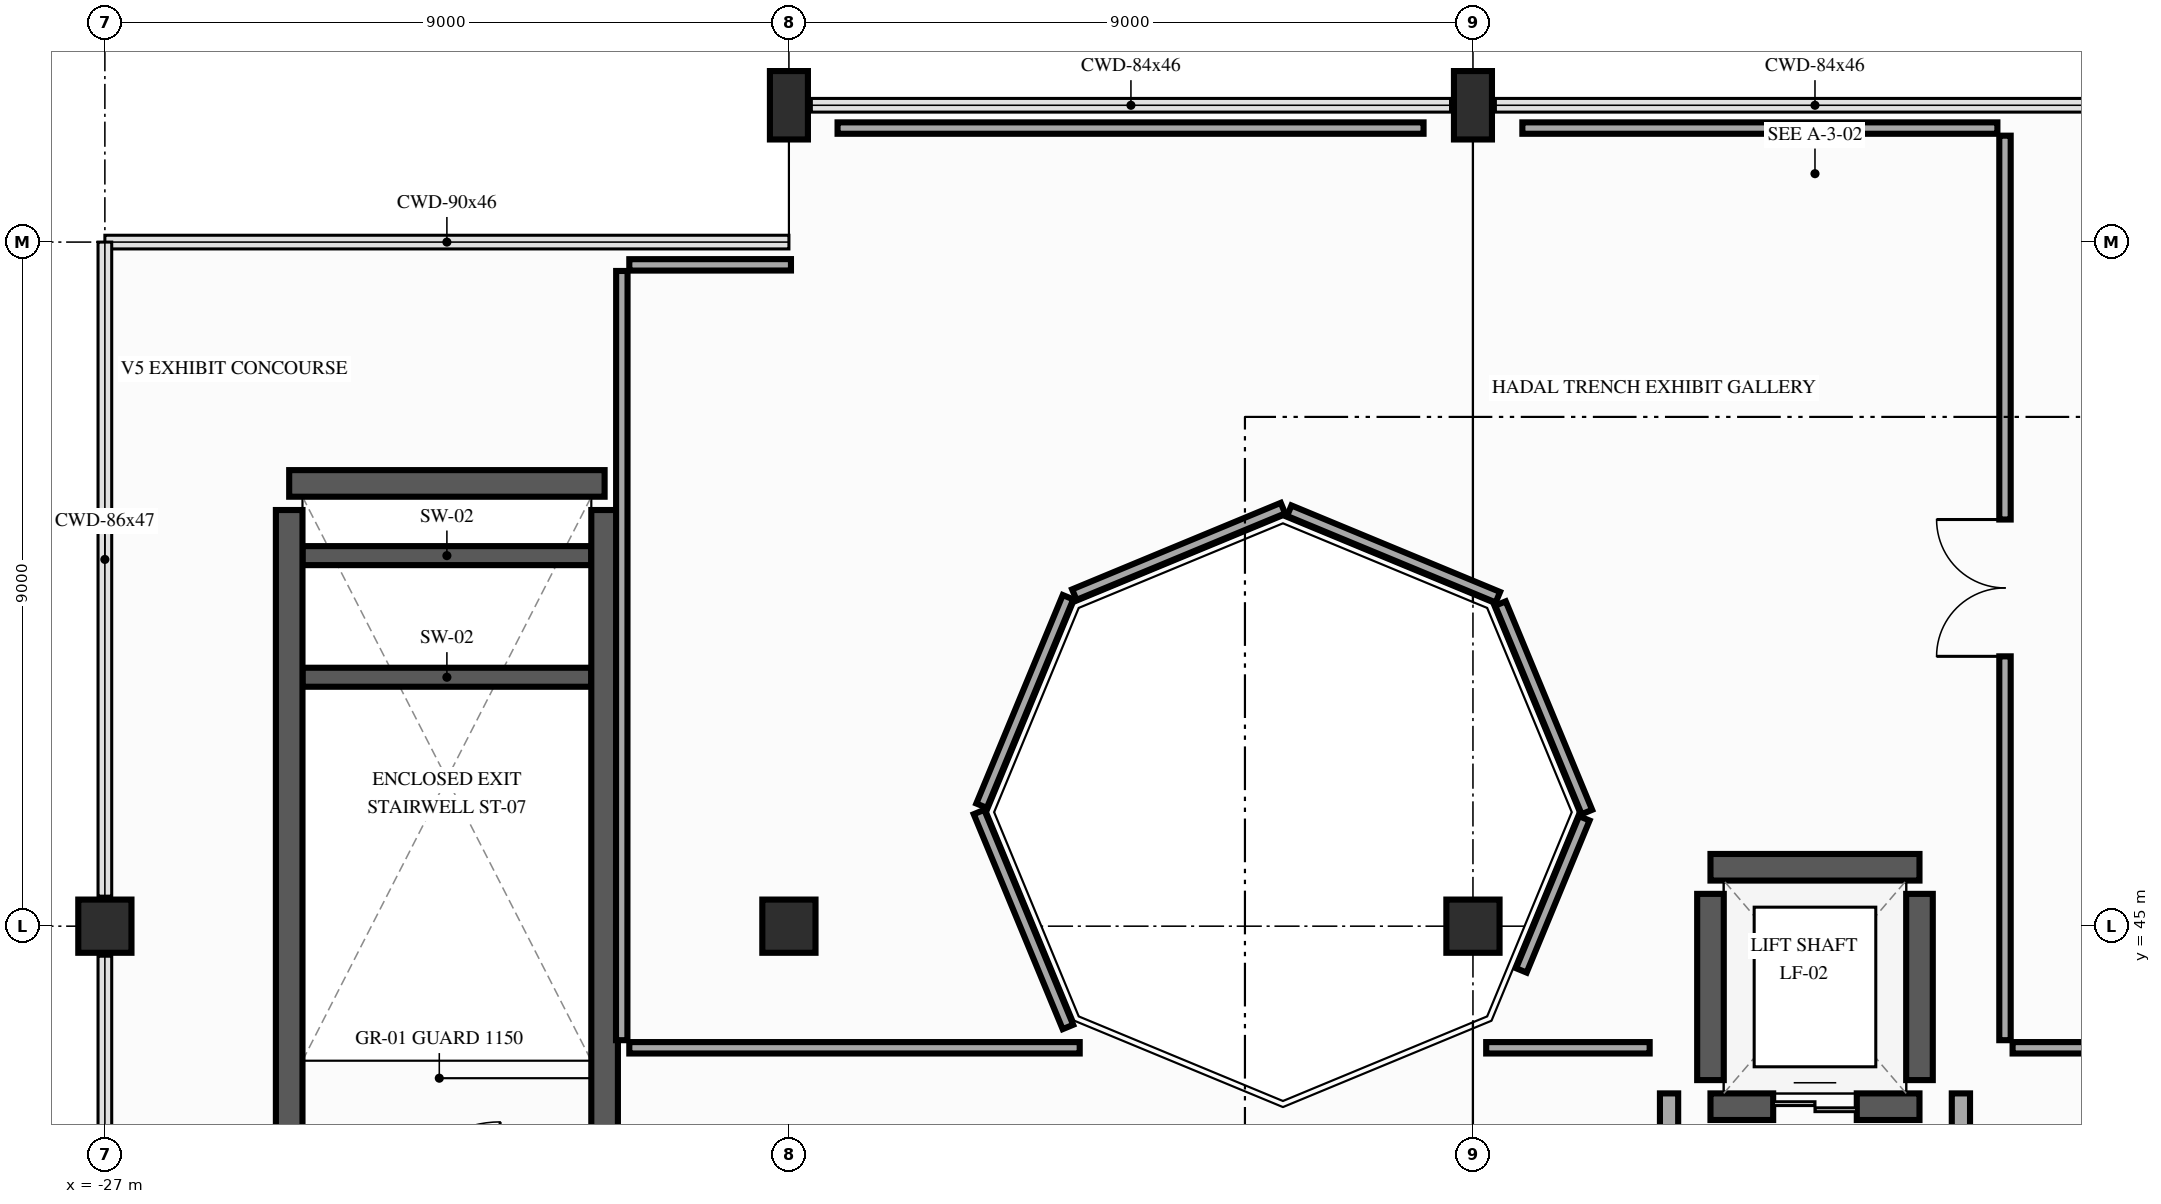
"""IFC4 building model, lengths in metres.
Left out: names, types, materials, properties, quantities, classifications, styles, units other than length and angle.
Written with IfcOpenShell. Run it as: python <this file> out.ifc"""

import sys

from ifc_helpers import new_model, si_unit, direction, frame, frame_2d, origin, origin_2d, place, context, subcontext, project, spatial, rectangle, extrude, element, fill, save


model = new_model("IFC4")
c1 = context("Model", 3, precision=1e-05, world=origin(), true_north=direction((0.0, 1.0)))
c2 = subcontext(c1, "Body", "Model", "MODEL_VIEW")
j1 = project(units=[si_unit("LENGTHUNIT", "METRE"), si_unit("PLANEANGLEUNIT", "RADIAN")], contexts=[c1])
p1 = place(None, origin())
s1 = spatial("IfcSite", under=j1, at=p1, CompositionType="ELEMENT")
p2 = place(p1, origin())
s2 = spatial("IfcBuilding", under=s1, at=p2, CompositionType="ELEMENT")
p3 = place(p2, frame((0.0, 0.0, 21.6)))
s3 = spatial("IfcBuildingStorey", under=s2, at=p3, CompositionType="ELEMENT", Elevation=21.6)
for number, where, z_axis, x_axis in (
    (1, (-27.0, 45.0, 0.0), (0.0, 0.0, 1.0), (1.0, 0.0, 0.0)),
    (2, (-18.0, 45.0, 0.0), (0.0, 0.0, 1.0), (1.0, 0.0, 0.0)),
):
    element("IfcColumn", number, at=place(p3, frame(where, z_axis=z_axis, x_axis=x_axis)), inside=s3, PredefinedType="COLUMN", context=c2, shape_type="SweptSolid", body=[
        extrude(rectangle(XDim=0.7, YDim=0.7, at=origin_2d()), origin(), (0.0, 0.0, 1.0), 5.4),
    ])
p4 = place(p3, frame((-18.0, 55.8, 0.0), z_axis=(0.0, 0.0, 1.0), x_axis=(1.0, 0.0, 0.0)))
e3 = element("IfcColumn", 3, at=p4, inside=s3, PredefinedType="PILASTER", context=c2, shape_type="SweptSolid", body=[
    extrude(rectangle(XDim=0.5, YDim=0.9, at=origin_2d()), origin(), (0.0, 0.0, 1.0), 5.4),
])
p5 = place(p3, frame((-9.0, 45.0, 0.0), z_axis=(0.0, 0.0, 1.0), x_axis=(1.0, 0.0, 0.0)))
e4 = element("IfcColumn", 4, at=p5, inside=s3, PredefinedType="COLUMN", context=c2, shape_type="SweptSolid", body=[
    extrude(rectangle(XDim=0.7, YDim=0.7, at=origin_2d()), origin(), (0.0, 0.0, 1.0), 5.4),
])
p6 = place(p3, frame((-9.0, 55.8, 0.0), z_axis=(0.0, 0.0, 1.0), x_axis=(1.0, 0.0, 0.0)))
e5 = element("IfcColumn", 5, at=p6, inside=s3, PredefinedType="PILASTER", context=c2, shape_type="SweptSolid", body=[
    extrude(rectangle(XDim=0.5, YDim=0.9, at=origin_2d()), origin(), (0.0, 0.0, 1.0), 5.4),
])
for number, where, z_axis, x_axis in (
    (6, (-24.4, 48.275, 0.0), (0.0, 0.0, 1.0), (1.0, 0.0, 0.0)),
    (7, (-24.4, 49.875, 0.0), (0.0, 0.0, 1.0), (1.0, 0.0, 0.0)),
):
    element("IfcWall", number, at=place(p3, frame(where, z_axis=z_axis, x_axis=x_axis)), inside=s3, PredefinedType="SHEAR", context=c2, shape_type="SweptSolid", body=[
        extrude(rectangle(XDim=3.8, YDim=0.25, at=frame_2d((1.9, 0.0))), origin(), (0.0, 0.0, 1.0), 2.5),
    ])
p7 = place(p3, frame((-24.575, 50.825, 0.0), z_axis=(0.0, 0.0, 1.0), x_axis=(1.0, 0.0, 0.0)))
e8 = element("IfcWall", 8, at=p7, inside=s3, PredefinedType="SHEAR", context=c2, shape_type="SweptSolid", body=[
    extrude(rectangle(XDim=4.15, YDim=0.35, at=frame_2d((2.075, 0.0))), origin(), (0.0, 0.0, 1.0), 5.15),
])
for number, where, z_axis, x_axis in (
    (9, (-24.575, 41.375, 0.0), (0.0, 0.0, 1.0), (0.0, 1.0, 0.0)),
    (10, (-20.425, 41.375, 0.0), (0.0, 0.0, 1.0), (0.0, 1.0, 0.0)),
):
    element("IfcWall", number, at=place(p3, frame(where, z_axis=z_axis, x_axis=x_axis)), inside=s3, PredefinedType="SHEAR", context=c2, shape_type="SweptSolid", body=[
        extrude(rectangle(XDim=9.1, YDim=0.35, at=frame_2d((4.55, 0.0))), origin(), (0.0, 0.0, 1.0), 5.15),
    ])
p8 = place(p3, frame((-5.875, 42.625, 0.0), z_axis=(0.0, 0.0, 1.0), x_axis=(1.0, 0.0, 0.0)))
e11 = element("IfcWall", 11, at=p8, inside=s3, PredefinedType="SHEAR", context=c2, shape_type="SweptSolid", body=[
    extrude(rectangle(XDim=2.75, YDim=0.35, at=frame_2d((1.375, 0.0))), origin(), (0.0, 0.0, 1.0), 5.15),
])
p9 = place(p8, frame((0.825, 0.0, 0.0)))
e12 = element("IfcOpeningElement", 12, at=p9, cuts=e11, PredefinedType="OPENING", context=c2, shape_type="SweptSolid", body=[
    extrude(rectangle(XDim=1.1, YDim=2.2, at=frame_2d((0.55, 1.1))), frame((0.0, 0.185, 0.0), z_axis=(0.0, -1.0, 0.0), x_axis=(1.0, 0.0, 0.0)), (0.0, 0.0, 1.0), 0.37),
])
p10 = place(p3, frame((-3.125, 45.775, 0.0), z_axis=(0.0, 0.0, 1.0), x_axis=(-1.0, 0.0, 0.0)))
e13 = element("IfcWall", 13, at=p10, inside=s3, PredefinedType="SHEAR", context=c2, shape_type="SweptSolid", body=[
    extrude(rectangle(XDim=2.75, YDim=0.35, at=frame_2d((1.375, 0.0))), origin(), (0.0, 0.0, 1.0), 5.15),
])
for number, where, z_axis, x_axis in (
    (14, (-5.875, 42.975, 0.0), (0.0, 0.0, 1.0), (0.0, 1.0, 0.0)),
    (15, (-3.125, 42.975, 0.0), (0.0, 0.0, 1.0), (0.0, 1.0, 0.0)),
):
    element("IfcWall", number, at=place(p3, frame(where, z_axis=z_axis, x_axis=x_axis)), inside=s3, PredefinedType="SHEAR", context=c2, shape_type="SweptSolid", body=[
        extrude(rectangle(XDim=2.45, YDim=0.35, at=frame_2d((1.225, 0.0))), origin(), (0.0, 0.0, 1.0), 5.15),
    ])
for number, where, z_axis, x_axis in (
    (16, (-6.42, 39.2, 0.0), (0.0, 0.0, 1.0), (0.0, 1.0, 0.0)),
    (17, (-2.58, 39.2, 0.0), (0.0, 0.0, 1.0), (0.0, 1.0, 0.0)),
):
    element("IfcWall", number, at=place(p3, frame(where, z_axis=z_axis, x_axis=x_axis)), inside=s3, PredefinedType="PARTITIONING", context=c2, shape_type="SweptSolid", body=[
        extrude(rectangle(XDim=3.6, YDim=0.24, at=frame_2d((1.8, 0.0))), origin(), (0.0, 0.0, 1.0), 5.1),
    ])
p11 = place(p3, frame((-20.198, 53.62, 0.0), z_axis=(0.0, 0.0, 1.0), x_axis=(-0.000192994303, -0.999999981377, 0.0)))
e18 = element("IfcWall", 18, at=p11, inside=s3, PredefinedType="PARTITIONING", context=c2, shape_type="SweptSolid", body=[
    extrude(rectangle(XDim=10.12, YDim=0.15, at=frame_2d((5.06, 0.0))), origin(), (0.0, 0.0, 1.0), 5.05),
])
p12 = place(p3, frame((-20.1, 43.4, 0.0), z_axis=(0.0, 0.0, 1.0), x_axis=(1.0, 0.0, 0.0)))
e19 = element("IfcWall", 19, at=p12, inside=s3, PredefinedType="PARTITIONING", context=c2, shape_type="SweptSolid", body=[
    extrude(rectangle(XDim=5.926, YDim=0.15, at=frame_2d((2.963, 0.0))), origin(), (0.0, 0.0, 1.0), 4.685),
])
p13 = place(p3, frame((-14.329, 43.674, 0.0), z_axis=(0.0, 0.0, 1.0), x_axis=(-0.382286027274, 0.924044042971, 0.0)))
e20 = element("IfcWall", 20, at=p13, inside=s3, PredefinedType="PARTITIONING", context=c2, shape_type="SweptSolid", body=[
    extrude(rectangle(XDim=3.06, YDim=0.15, at=frame_2d((1.53, 0.0))), origin(), (0.0, 0.0, 1.0), 4.635),
])
p14 = place(p3, frame((-15.465, 46.585, 0.0), z_axis=(0.0, 0.0, 1.0), x_axis=(0.382985932097, 0.923754174992, 0.0)))
e21 = element("IfcWall", 21, at=p14, inside=s3, PredefinedType="PARTITIONING", context=c2, shape_type="SweptSolid", body=[
    extrude(rectangle(XDim=2.969, YDim=0.15, at=frame_2d((1.485, 0.0))), origin(), (0.0, 0.0, 1.0), 5.05),
])
p15 = place(p3, frame((-14.245, 49.362, 0.0), z_axis=(0.0, 0.0, 1.0), x_axis=(0.923775431697, 0.382934657341, 0.0)))
e22 = element("IfcWall", 22, at=p15, inside=s3, PredefinedType="PARTITIONING", context=c2, shape_type="SweptSolid", body=[
    extrude(rectangle(XDim=2.972, YDim=0.15, at=frame_2d((1.486, 0.0))), origin(), (0.0, 0.0, 1.0), 5.05),
])
p16 = place(p3, frame((-11.417, 50.466, 0.0), z_axis=(0.0, 0.0, 1.0), x_axis=(0.923734314356, -0.383033832031, 0.0)))
e23 = element("IfcWall", 23, at=p16, inside=s3, PredefinedType="PARTITIONING", context=c2, shape_type="SweptSolid", body=[
    extrude(rectangle(XDim=2.971, YDim=0.15, at=frame_2d((1.486, 0.0))), origin(), (0.0, 0.0, 1.0), 4.685),
])
p17 = place(p3, frame((-8.638, 49.245, 0.0), z_axis=(0.0, 0.0, 1.0), x_axis=(0.382886684653, -0.923795316461, 0.0)))
e24 = element("IfcWall", 24, at=p17, inside=s3, PredefinedType="PARTITIONING", context=c2, shape_type="SweptSolid", body=[
    extrude(rectangle(XDim=2.969, YDim=0.15, at=frame_2d((1.485, 0.0))), origin(), (0.0, 0.0, 1.0), 4.685),
])
p18 = place(p3, frame((-7.535, 46.419, 0.0), z_axis=(0.0, 0.0, 1.0), x_axis=(-0.382404898799, -0.923994855708, 0.0)))
e25 = element("IfcWall", 25, at=p18, inside=s3, PredefinedType="PARTITIONING", context=c2, shape_type="SweptSolid", body=[
    extrude(rectangle(XDim=2.166, YDim=0.15, at=frame_2d((1.083, 0.0))), origin(), (0.0, 0.0, 1.0), 5.05),
])
p19 = place(p3, frame((-8.826, 43.4, 0.0), z_axis=(0.0, 0.0, 1.0), x_axis=(1.0, 0.0, 0.0)))
e26 = element("IfcWall", 26, at=p19, inside=s3, PredefinedType="PARTITIONING", context=c2, shape_type="SweptSolid", body=[
    extrude(rectangle(XDim=2.151, YDim=0.15, at=frame_2d((1.075, 0.0))), origin(), (0.0, 0.0, 1.0), 4.685),
])
p20 = place(p3, frame((-2.0, 43.5, 0.0), z_axis=(0.0, 0.0, 1.0), x_axis=(0.0, 1.0, 0.0)))
e27 = element("IfcWall", 27, at=p20, inside=s3, PredefinedType="PARTITIONING", context=c2, shape_type="SweptSolid", body=[
    extrude(rectangle(XDim=11.9, YDim=0.15, at=frame_2d((5.95, 0.0))), origin(), (0.0, 0.0, 1.0), 4.635),
])
p21 = place(p20, frame((5.05, 0.0, 0.0)))
e28 = element("IfcOpeningElement", 28, at=p21, cuts=e27, PredefinedType="OPENING", context=c2, shape_type="SweptSolid", body=[
    extrude(rectangle(XDim=1.8, YDim=2.3, at=frame_2d((0.9, 1.15))), frame((0.0, 0.085, 0.0), z_axis=(0.0, -1.0, 0.0), x_axis=(1.0, 0.0, 0.0)), (0.0, 0.0, 1.0), 0.17),
])
p22 = place(p3, frame((-2.1, 55.5, 0.0), z_axis=(0.0, 0.0, 1.0), x_axis=(-1.0, 0.0, 0.0)))
e29 = element("IfcWall", 29, at=p22, inside=s3, PredefinedType="PARTITIONING", context=c2, shape_type="SweptSolid", body=[
    extrude(rectangle(XDim=6.25, YDim=0.15, at=frame_2d((3.125, 0.0))), origin(), (0.0, 0.0, 1.0), 4.635),
])
p23 = place(p3, frame((-9.65, 55.5, 0.0), z_axis=(0.0, 0.0, 1.0), x_axis=(-1.0, 0.0, 0.0)))
e30 = element("IfcWall", 30, at=p23, inside=s3, PredefinedType="PARTITIONING", context=c2, shape_type="SweptSolid", body=[
    extrude(rectangle(XDim=7.71, YDim=0.15, at=frame_2d((3.855, 0.0))), origin(), (0.0, 0.0, 1.0), 4.635),
])
p24 = place(p3, frame((-17.973, 53.701, 0.0), z_axis=(0.0, 0.0, 1.0), x_axis=(-0.999999894621, -0.000459084079, 0.0)))
e31 = element("IfcWall", 31, at=p24, inside=s3, PredefinedType="PARTITIONING", context=c2, shape_type="SweptSolid", body=[
    extrude(rectangle(XDim=2.127, YDim=0.15, at=frame_2d((1.063, 0.0))), origin(), (0.0, 0.0, 1.0), 4.685),
])
p25 = place(p3, frame((-1.9, 43.4, 0.0), z_axis=(0.0, 0.0, 1.0), x_axis=(1.0, 0.0, 0.0)))
e32 = element("IfcWall", 32, at=p25, inside=s3, PredefinedType="PARTITIONING", context=c2, shape_type="SweptSolid", body=[
    extrude(rectangle(XDim=13.0, YDim=0.15, at=frame_2d((6.5, 0.0))), origin(), (0.0, 0.0, 1.0), 4.685),
])
p26 = place(p25, frame((5.6, 0.0, 0.0)))
e33 = element("IfcOpeningElement", 33, at=p26, cuts=e32, PredefinedType="OPENING", context=c2, shape_type="SweptSolid", body=[
    extrude(rectangle(XDim=1.8, YDim=2.3, at=frame_2d((0.9, 1.15))), frame((0.0, 0.085, 0.0), z_axis=(0.0, -1.0, 0.0), x_axis=(1.0, 0.0, 0.0)), (0.0, 0.0, 1.0), 0.17),
])
p27 = place(p9, origin())
e34 = element("IfcDoor", 34, at=p27, inside=s3, OperationType="DOUBLE_DOOR_SLIDING", PredefinedType="DOOR", context=c2, shape_type="SweptSolid", body=[
    extrude(rectangle(XDim=1.1, YDim=2.2, at=frame_2d((0.55, 1.1))), frame((0.0, 0.025, 0.0), z_axis=(0.0, -1.0, 0.0), x_axis=(1.0, 0.0, 0.0)), (0.0, 0.0, 1.0), 0.05),
])
fill(e12, e34)
p28 = place(p21, origin())
e35 = element("IfcDoor", 35, at=p28, inside=s3, OperationType="DOUBLE_DOOR_SINGLE_SWING", PredefinedType="DOOR", context=c2, shape_type="SweptSolid", body=[
    extrude(rectangle(XDim=1.8, YDim=2.3, at=frame_2d((0.9, 1.15))), frame((0.0, 0.025, 0.0), z_axis=(0.0, -1.0, 0.0), x_axis=(1.0, 0.0, 0.0)), (0.0, 0.0, 1.0), 0.05),
])
fill(e28, e35)
save(model, sys.argv[1])
